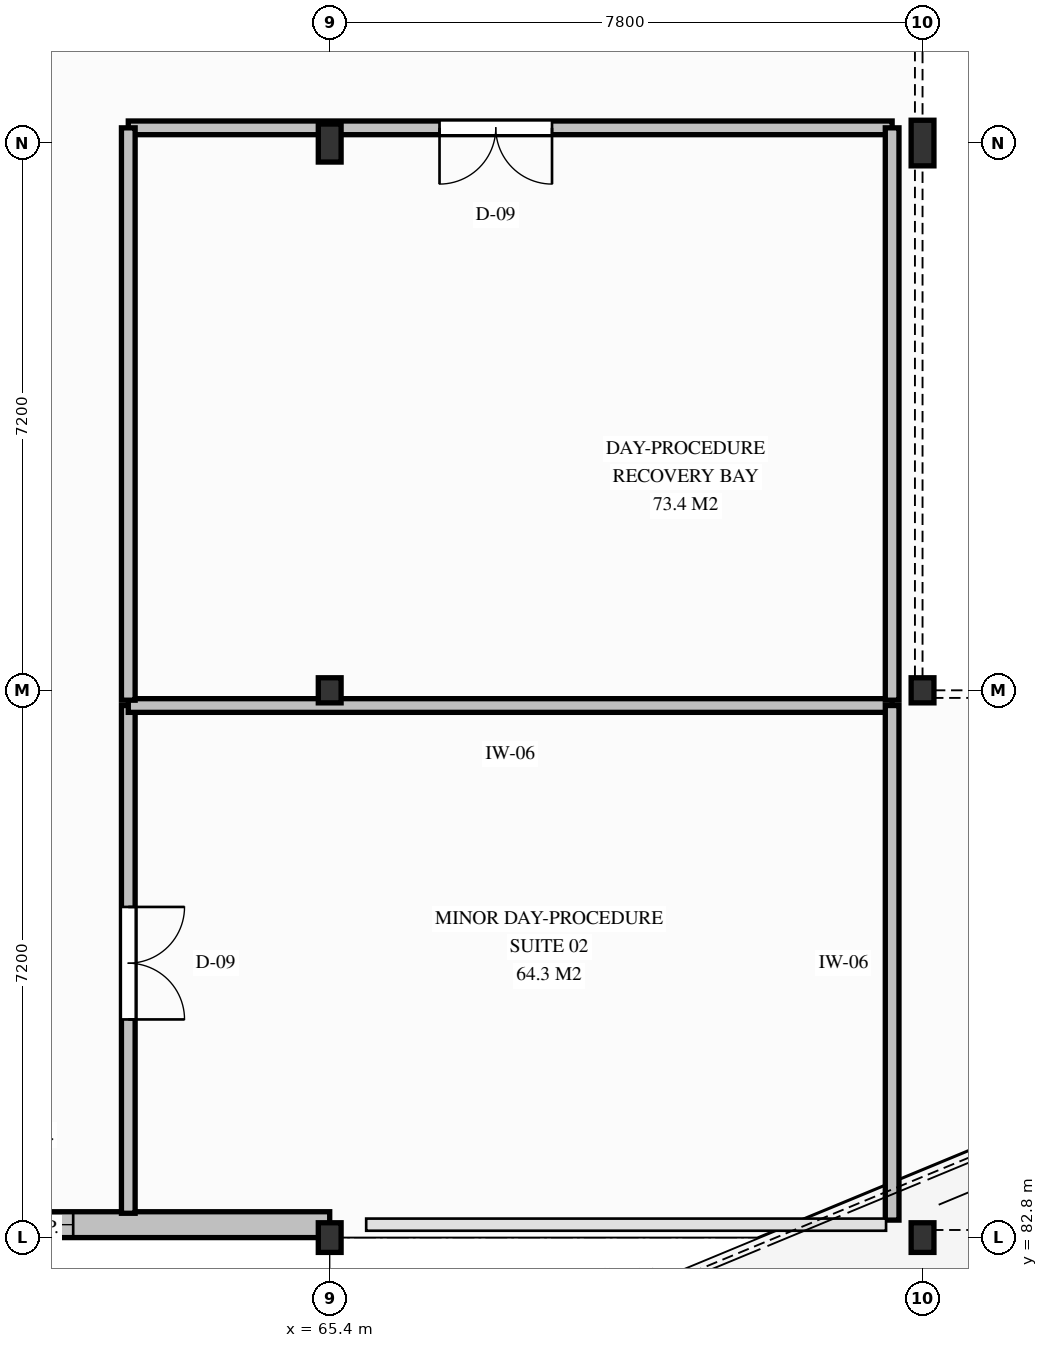
"""IFC4 building model, lengths in metres.
Left out: names, types, materials, properties, quantities, classifications, styles, units other than length and angle.
Written with IfcOpenShell. Run it as: python <this file> out.ifc"""

import sys

from ifc_helpers import new_model, si_unit, direction, frame, frame_2d, origin, origin_2d, place, context, subcontext, project, spatial, rectangle, i_section, extrude, element, fill, save


model = new_model("IFC4")
c1 = context("Model", 3, precision=1e-05, world=origin(), true_north=direction((0.0, 1.0)))
c2 = subcontext(c1, "Body", "Model", "MODEL_VIEW")
j1 = project(units=[si_unit("LENGTHUNIT", "METRE"), si_unit("PLANEANGLEUNIT", "RADIAN")], contexts=[c1])
p1 = place(None, origin())
s1 = spatial("IfcSite", under=j1, at=p1, CompositionType="ELEMENT")
p2 = place(p1, origin())
s2 = spatial("IfcBuilding", under=s1, at=p2, CompositionType="ELEMENT")
p3 = place(p2, frame((0.0, 0.0, 9.0)))
s3 = spatial("IfcBuildingStorey", under=s2, at=p3, CompositionType="ELEMENT", Elevation=9.0)
p4 = place(p3, frame((65.4, 82.8, 0.0), z_axis=(0.0, 0.0, 1.0), x_axis=(1.0, 0.0, 0.0)))
e1 = element("IfcColumn", 1, at=p4, inside=s3, PredefinedType="COLUMN", context=c2, shape_type="SweptSolid", body=[
    extrude(i_section(OverallWidth=0.3, OverallDepth=0.39, WebThickness=0.011, FlangeThickness=0.019, FilletRadius=0.027, at=origin_2d()), origin(), (0.0, 0.0, 1.0), 4.2),
])
p5 = place(p3, frame((65.4, 90.0, 0.0), z_axis=(0.0, 0.0, 1.0), x_axis=(1.0, 0.0, 0.0)))
e2 = element("IfcColumn", 2, at=p5, inside=s3, PredefinedType="COLUMN", context=c2, shape_type="SweptSolid", body=[
    extrude(i_section(OverallWidth=0.3, OverallDepth=0.33, WebThickness=0.01, FlangeThickness=0.017, FilletRadius=0.027, at=origin_2d()), origin(), (0.0, 0.0, 1.0), 4.2),
])
p6 = place(p3, frame((65.4, 97.2, 0.0), z_axis=(0.0, 0.0, 1.0), x_axis=(1.0, 0.0, 0.0)))
e3 = element("IfcColumn", 3, at=p6, inside=s3, PredefinedType="COLUMN", context=c2, shape_type="SweptSolid", body=[
    extrude(i_section(OverallWidth=0.3, OverallDepth=0.5, WebThickness=0.014, FlangeThickness=0.028, FilletRadius=0.027, at=origin_2d()), origin(), (0.0, 0.0, 1.0), 4.2),
])
p7 = place(p3, frame((73.2, 82.8, 0.0), z_axis=(0.0, 0.0, 1.0), x_axis=(1.0, 0.0, 0.0)))
e4 = element("IfcColumn", 4, at=p7, inside=s3, PredefinedType="COLUMN", context=c2, shape_type="SweptSolid", body=[
    extrude(i_section(OverallWidth=0.3, OverallDepth=0.39, WebThickness=0.011, FlangeThickness=0.019, FilletRadius=0.027, at=origin_2d()), origin(), (0.0, 0.0, 1.0), 4.2),
])
p8 = place(p3, frame((73.2, 90.0, 0.0), z_axis=(0.0, 0.0, 1.0), x_axis=(1.0, 0.0, 0.0)))
e5 = element("IfcColumn", 5, at=p8, inside=s3, PredefinedType="COLUMN", context=c2, shape_type="SweptSolid", body=[
    extrude(i_section(OverallWidth=0.3, OverallDepth=0.33, WebThickness=0.01, FlangeThickness=0.017, FilletRadius=0.027, at=origin_2d()), origin(), (0.0, 0.0, 1.0), 4.2),
])
p9 = place(p3, frame((73.2, 97.2, 0.0), z_axis=(0.0, 0.0, 1.0), x_axis=(1.0, 0.0, 0.0)))
e6 = element("IfcColumn", 6, at=p9, inside=s3, PredefinedType="COLUMN", context=c2, shape_type="SweptSolid", body=[
    extrude(i_section(OverallWidth=0.3, OverallDepth=0.6, WebThickness=0.015, FlangeThickness=0.03, FilletRadius=0.027, at=origin_2d()), origin(), (0.0, 0.0, 1.0), 4.2),
])
p10 = place(p3, frame((65.4, 82.97, 0.0), z_axis=(0.0, 0.0, 1.0), x_axis=(-1.0, 0.0, 0.0)))
e7 = element("IfcWall", 7, at=p10, inside=s3, PredefinedType="SOLIDWALL", context=c2, shape_type="SweptSolid", body=[
    extrude(rectangle(XDim=8.4, YDim=0.34, at=frame_2d((4.2, 0.0))), origin(), (0.0, 0.0, 1.0), 3.328),
])
p11 = place(p10, frame((3.375, 0.0, 0.85)))
e8 = element("IfcOpeningElement", 8, at=p11, cuts=e7, PredefinedType="OPENING", context=c2, shape_type="SweptSolid", body=[
    extrude(rectangle(XDim=1.65, YDim=1.45, at=frame_2d((0.825, 0.725))), frame((0.0, 0.18, 0.0), z_axis=(0.0, -1.0, 0.0), x_axis=(1.0, 0.0, 0.0)), (0.0, 0.0, 1.0), 0.36),
])
p12 = place(p3, frame((62.75, 89.8, 0.0), z_axis=(0.0, 0.0, 1.0), x_axis=(0.0, -1.0, 0.0)))
e9 = element("IfcWall", 9, at=p12, inside=s3, PredefinedType="PARTITIONING", context=c2, shape_type="SweptSolid", body=[
    extrude(rectangle(XDim=6.68, YDim=0.18, at=frame_2d((3.34, 0.0))), origin(), (0.0, 0.0, 1.0), 3.598),
])
p13 = place(p12, frame((2.65, 0.0, 0.0)))
e10 = element("IfcOpeningElement", 10, at=p13, cuts=e9, PredefinedType="OPENING", context=c2, shape_type="SweptSolid", body=[
    extrude(rectangle(XDim=1.48, YDim=2.24, at=frame_2d((0.74, 1.12))), frame((0.0, 0.1, 0.0), z_axis=(0.0, -1.0, 0.0), x_axis=(1.0, 0.0, 0.0)), (0.0, 0.0, 1.0), 0.2),
])
p14 = place(p3, frame((72.8, 89.8, 0.0), z_axis=(0.0, 0.0, 1.0), x_axis=(-1.0, 0.0, 0.0)))
e11 = element("IfcWall", 11, at=p14, inside=s3, PredefinedType="PARTITIONING", context=c2, shape_type="SweptSolid", body=[
    extrude(rectangle(XDim=10.05, YDim=0.18, at=frame_2d((5.025, 0.0))), origin(), (0.0, 0.0, 1.0), 3.328),
])
p15 = place(p3, frame((72.8, 83.03, 0.0), z_axis=(0.0, 0.0, 1.0), x_axis=(0.0, 1.0, 0.0)))
e12 = element("IfcWall", 12, at=p15, inside=s3, PredefinedType="PARTITIONING", context=c2, shape_type="SweptSolid", body=[
    extrude(rectangle(XDim=6.77, YDim=0.18, at=frame_2d((3.385, 0.0))), origin(), (0.0, 0.0, 1.0), 3.598),
])
p16 = place(p3, frame((72.8, 97.4, 0.0), z_axis=(0.0, 0.0, 1.0), x_axis=(-1.0, 0.0, 0.0)))
e13 = element("IfcWall", 13, at=p16, inside=s3, PredefinedType="PARTITIONING", context=c2, shape_type="SweptSolid", body=[
    extrude(rectangle(XDim=10.05, YDim=0.18, at=frame_2d((5.025, 0.0))), origin(), (0.0, 0.0, 1.0), 3.428),
])
p17 = place(p16, frame((4.475, 0.0, 0.0)))
e14 = element("IfcOpeningElement", 14, at=p17, cuts=e13, PredefinedType="OPENING", context=c2, shape_type="SweptSolid", body=[
    extrude(rectangle(XDim=1.48, YDim=2.24, at=frame_2d((0.74, 1.12))), frame((0.0, 0.1, 0.0), z_axis=(0.0, -1.0, 0.0), x_axis=(1.0, 0.0, 0.0)), (0.0, 0.0, 1.0), 0.2),
])
p18 = place(p3, frame((62.75, 97.4, 0.0), z_axis=(0.0, 0.0, 1.0), x_axis=(0.0, -1.0, 0.0)))
e15 = element("IfcWall", 15, at=p18, inside=s3, PredefinedType="PARTITIONING", context=c2, shape_type="SweptSolid", body=[
    extrude(rectangle(XDim=7.53, YDim=0.18, at=frame_2d((3.765, 0.0))), origin(), (0.0, 0.0, 1.0), 3.428),
])
p19 = place(p3, frame((72.8, 89.87, 0.0), z_axis=(0.0, 0.0, 1.0), x_axis=(0.0, 1.0, 0.0)))
e16 = element("IfcWall", 16, at=p19, inside=s3, PredefinedType="PARTITIONING", context=c2, shape_type="SweptSolid", body=[
    extrude(rectangle(XDim=7.53, YDim=0.18, at=frame_2d((3.765, 0.0))), origin(), (0.0, 0.0, 1.0), 3.478),
])
p20 = place(p11, origin())
e17 = element("IfcWindow", 17, at=p20, inside=s3, PartitioningType="SINGLE_PANEL", PredefinedType="WINDOW", context=c2, shape_type="SweptSolid", body=[
    extrude(rectangle(XDim=1.65, YDim=1.45, at=frame_2d((0.825, 0.725))), frame((0.0, 0.03, 0.0), z_axis=(0.0, -1.0, 0.0), x_axis=(1.0, 0.0, 0.0)), (0.0, 0.0, 1.0), 0.06),
])
fill(e8, e17)
p21 = place(p13, origin())
e18 = element("IfcDoor", 18, at=p21, inside=s3, OperationType="DOUBLE_DOOR_SINGLE_SWING", PredefinedType="DOOR", context=c2, shape_type="SweptSolid", body=[
    extrude(rectangle(XDim=1.48, YDim=2.24, at=frame_2d((0.74, 1.12))), frame((0.0, 0.025, 0.0), z_axis=(0.0, -1.0, 0.0), x_axis=(1.0, 0.0, 0.0)), (0.0, 0.0, 1.0), 0.05),
])
fill(e10, e18)
p22 = place(p17, origin())
e19 = element("IfcDoor", 19, at=p22, inside=s3, OperationType="DOUBLE_DOOR_SINGLE_SWING", PredefinedType="DOOR", context=c2, shape_type="SweptSolid", body=[
    extrude(rectangle(XDim=1.48, YDim=2.24, at=frame_2d((0.74, 1.12))), frame((0.0, 0.025, 0.0), z_axis=(0.0, -1.0, 0.0), x_axis=(1.0, 0.0, 0.0)), (0.0, 0.0, 1.0), 0.05),
])
fill(e14, e19)
save(model, sys.argv[1])
